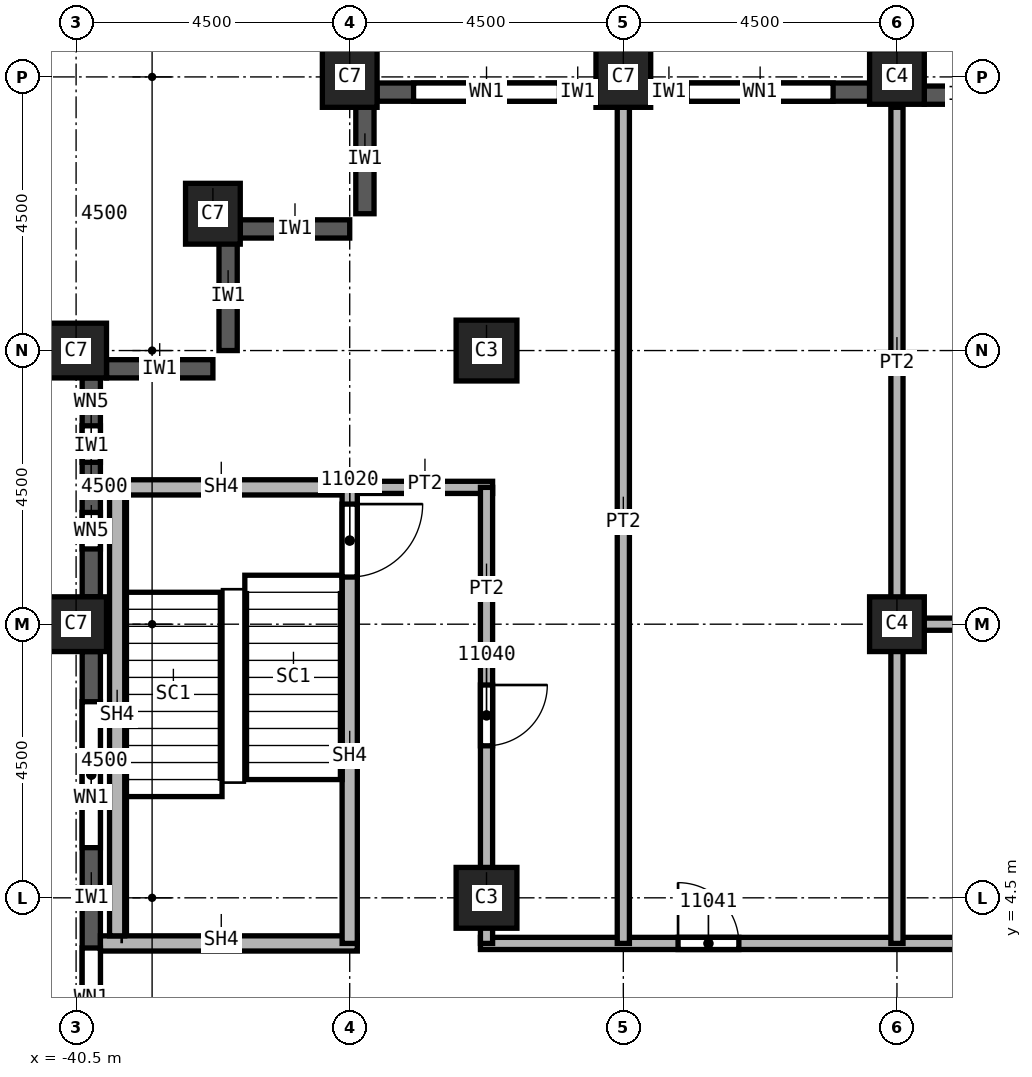
"""IFC4 building model, lengths in metres.
Left out: names, types, materials, properties, quantities, classifications, styles, units other than length and angle.
Written with IfcOpenShell. Run it as: python <this file> out.ifc"""

import sys

from ifc_helpers import new_model, si_unit, direction, frame, frame_2d, origin, origin_2d, place, context, subcontext, project, spatial, rectangle, extrude, element, fill, save


model = new_model("IFC4")
c1 = context("Model", 3, precision=1e-05, world=origin(), true_north=direction((0.0, 1.0)))
c2 = subcontext(c1, "Body", "Model", "MODEL_VIEW")
j1 = project(units=[si_unit("LENGTHUNIT", "METRE"), si_unit("PLANEANGLEUNIT", "RADIAN")], contexts=[c1])
p1 = place(None, origin())
s1 = spatial("IfcSite", under=j1, at=p1, CompositionType="ELEMENT")
p2 = place(p1, origin())
s2 = spatial("IfcBuilding", under=s1, at=p2, CompositionType="ELEMENT")
p3 = place(p2, frame((0.0, 0.0, 184.0)))
s3 = spatial("IfcBuildingStorey", under=s2, at=p3, CompositionType="ELEMENT", Elevation=184.0)
for number, where, z_axis, x_axis in (
    (1, (-40.5, 9.0, 0.0), (0.0, 0.0, 1.0), (0.0, 1.0, 0.0)),
    (2, (-40.5, 13.5, 0.0), (0.0, 0.0, 1.0), (0.0, 1.0, 0.0)),
    (3, (-38.25, 15.75, 0.0), (0.0, 0.0, 1.0), (1.0, 0.0, 0.0)),
    (4, (-31.5, 18.0, 0.0), (0.0, 0.0, 1.0), (1.0, 0.0, 0.0)),
    (5, (-36.0, 18.0, 0.0), (0.0, 0.0, 1.0), (1.0, 0.0, 0.0)),
):
    element("IfcColumn", number, at=place(p3, frame(where, z_axis=z_axis, x_axis=x_axis)), inside=s3, PredefinedType="COLUMN", context=c2, shape_type="SweptSolid", body=[
        extrude(rectangle(XDim=0.9, YDim=1.0, at=origin_2d()), origin(), (0.0, 0.0, 1.0), 3.72),
    ])
for number, where, z_axis, x_axis in (
    (6, (-33.75, 4.5, 0.0), (0.0, 0.0, 1.0), (1.0, 0.0, 0.0)),
    (7, (-33.75, 13.5, 0.0), (0.0, 0.0, 1.0), (1.0, 0.0, 0.0)),
):
    element("IfcColumn", number, at=place(p3, frame(where, z_axis=z_axis, x_axis=x_axis)), inside=s3, PredefinedType="COLUMN", context=c2, shape_type="SweptSolid", body=[
        extrude(rectangle(XDim=1.0, YDim=1.0, at=origin_2d()), origin(), (0.0, 0.0, 1.0), 3.72),
    ])
for number, where, z_axis, x_axis in (
    (8, (-27.0, 9.0, 0.0), (0.0, 0.0, 1.0), (1.0, 0.0, 0.0)),
    (9, (-27.0, 18.0, 0.0), (0.0, 0.0, 1.0), (1.0, 0.0, 0.0)),
):
    element("IfcColumn", number, at=place(p3, frame(where, z_axis=z_axis, x_axis=x_axis)), inside=s3, PredefinedType="COLUMN", context=c2, shape_type="SweptSolid", body=[
        extrude(rectangle(XDim=0.9, YDim=0.9, at=origin_2d()), origin(), (0.0, 0.0, 1.0), 3.72),
    ])
for number, where, z_axis, x_axis in (
    (10, (-35.75, 17.55, 0.0), (0.0, 0.0, 1.0), (0.0, -1.0, 0.0)),
    (11, (-37.8, 15.5, 0.0), (0.0, 0.0, 1.0), (1.0, 0.0, 0.0)),
    (12, (-38.0, 15.3, 0.0), (0.0, 0.0, 1.0), (0.0, -1.0, 0.0)),
):
    element("IfcWall", number, at=place(p3, frame(where, z_axis=z_axis, x_axis=x_axis)), inside=s3, PredefinedType="SOLIDWALL", context=c2, shape_type="SweptSolid", body=[
        extrude(rectangle(XDim=1.8, YDim=0.3, at=frame_2d((0.9, 0.0))), origin(), (0.0, 0.0, 1.0), 3.12),
    ])
p4 = place(p3, frame((-40.0, 13.2, 0.0), z_axis=(0.0, 0.0, 1.0), x_axis=(1.0, 0.0, 0.0)))
e13 = element("IfcWall", 13, at=p4, inside=s3, PredefinedType="SOLIDWALL", context=c2, shape_type="SweptSolid", body=[
    extrude(rectangle(XDim=1.75, YDim=0.3, at=frame_2d((0.875, 0.0))), origin(), (0.0, 0.0, 1.0), 3.12),
])
p5 = place(p3, frame((-25.2, 17.7, 0.0), z_axis=(0.0, 0.0, 1.0), x_axis=(-1.0, 0.0, 0.0)))
e14 = element("IfcWall", 14, at=p5, inside=s3, PredefinedType="SOLIDWALL", context=c2, shape_type="SweptSolid", body=[
    extrude(rectangle(XDim=1.35, YDim=0.3, at=frame_2d((0.675, 0.0))), origin(), (0.0, 0.0, 1.0), 3.12),
])
p6 = place(p3, frame((-27.45, 17.75, 0.0), z_axis=(0.0, 0.0, 1.0), x_axis=(-1.0, 0.0, 0.0)))
e15 = element("IfcWall", 15, at=p6, inside=s3, PredefinedType="SOLIDWALL", context=c2, shape_type="SweptSolid", body=[
    extrude(rectangle(XDim=3.6, YDim=0.3, at=frame_2d((1.8, 0.0))), origin(), (0.0, 0.0, 1.0), 3.12),
])
p7 = place(p6, frame((0.6, 0.0, 0.8)))
e16 = element("IfcOpeningElement", 16, at=p7, cuts=e15, PredefinedType="OPENING", context=c2, shape_type="SweptSolid", body=[
    extrude(rectangle(XDim=2.4, YDim=1.95, at=frame_2d((1.2, 0.975))), frame((0.0, 0.15, 0.0), z_axis=(0.0, -1.0, 0.0), x_axis=(1.0, 0.0, 0.0)), (0.0, 0.0, 1.0), 0.3),
])
p8 = place(p3, frame((-31.95, 17.75, 0.0), z_axis=(0.0, 0.0, 1.0), x_axis=(-1.0, 0.0, 0.0)))
e17 = element("IfcWall", 17, at=p8, inside=s3, PredefinedType="SOLIDWALL", context=c2, shape_type="SweptSolid", body=[
    extrude(rectangle(XDim=3.6, YDim=0.3, at=frame_2d((1.8, 0.0))), origin(), (0.0, 0.0, 1.0), 3.12),
])
p9 = place(p8, frame((0.6, 0.0, 0.8)))
e18 = element("IfcOpeningElement", 18, at=p9, cuts=e17, PredefinedType="OPENING", context=c2, shape_type="SweptSolid", body=[
    extrude(rectangle(XDim=2.4, YDim=1.95, at=frame_2d((1.2, 0.975))), frame((0.0, 0.15, 0.0), z_axis=(0.0, -1.0, 0.0), x_axis=(1.0, 0.0, 0.0)), (0.0, 0.0, 1.0), 0.3),
])
p10 = place(p3, frame((-40.25, 13.05, 0.0), z_axis=(0.0, 0.0, 1.0), x_axis=(0.0, -1.0, 0.0)))
e19 = element("IfcWall", 19, at=p10, inside=s3, PredefinedType="SOLIDWALL", context=c2, shape_type="SweptSolid", body=[
    extrude(rectangle(XDim=3.6, YDim=0.3, at=frame_2d((1.8, 0.0))), origin(), (0.0, 0.0, 1.0), 3.12),
])
p11 = place(p10, frame((0.788, 0.0, 0.8)))
e20 = element("IfcOpeningElement", 20, at=p11, cuts=e19, PredefinedType="OPENING", context=c2, shape_type="SweptSolid", body=[
    extrude(rectangle(XDim=0.6, YDim=1.95, at=frame_2d((0.3, 0.975))), frame((0.0, 0.15, 0.0), z_axis=(0.0, -1.0, 0.0), x_axis=(1.0, 0.0, 0.0)), (0.0, 0.0, 1.0), 0.3),
])
p12 = place(p10, frame((2.212, 0.0, 0.8)))
e21 = element("IfcOpeningElement", 21, at=p12, cuts=e19, PredefinedType="OPENING", context=c2, shape_type="SweptSolid", body=[
    extrude(rectangle(XDim=0.6, YDim=1.95, at=frame_2d((0.3, 0.975))), frame((0.0, 0.15, 0.0), z_axis=(0.0, -1.0, 0.0), x_axis=(1.0, 0.0, 0.0)), (0.0, 0.0, 1.0), 0.3),
])
p13 = place(p3, frame((-40.25, 8.55, 0.0), z_axis=(0.0, 0.0, 1.0), x_axis=(0.0, -1.0, 0.0)))
e22 = element("IfcWall", 22, at=p13, inside=s3, PredefinedType="SOLIDWALL", context=c2, shape_type="SweptSolid", body=[
    extrude(rectangle(XDim=8.1, YDim=0.3, at=frame_2d((4.05, 0.0))), origin(), (0.0, 0.0, 1.0), 3.12),
])
p14 = place(p13, frame((0.825, 0.0, 0.8)))
e23 = element("IfcOpeningElement", 23, at=p14, cuts=e22, PredefinedType="OPENING", context=c2, shape_type="SweptSolid", body=[
    extrude(rectangle(XDim=2.4, YDim=1.95, at=frame_2d((1.2, 0.975))), frame((0.0, 0.15, 0.0), z_axis=(0.0, -1.0, 0.0), x_axis=(1.0, 0.0, 0.0)), (0.0, 0.0, 1.0), 0.3),
])
p15 = place(p13, frame((4.875, 0.0, 0.8)))
e24 = element("IfcOpeningElement", 24, at=p15, cuts=e22, PredefinedType="OPENING", context=c2, shape_type="SweptSolid", body=[
    extrude(rectangle(XDim=2.4, YDim=1.95, at=frame_2d((1.2, 0.975))), frame((0.0, 0.15, 0.0), z_axis=(0.0, -1.0, 0.0), x_axis=(1.0, 0.0, 0.0)), (0.0, 0.0, 1.0), 0.3),
])
p16 = place(p3, frame((-36.0, 11.25, 0.0), z_axis=(0.0, 0.0, 1.0), x_axis=(1.0, 0.0, 0.0)))
e25 = element("IfcWall", 25, at=p16, inside=s3, PredefinedType="PARTITIONING", context=c2, shape_type="SweptSolid", body=[
    extrude(rectangle(XDim=2.35, YDim=0.2, at=frame_2d((1.175, 0.0))), origin(), (0.0, 0.0, 1.0), 3.72),
])
p17 = place(p3, frame((-33.85, 3.75, 0.0), z_axis=(0.0, 0.0, 1.0), x_axis=(1.0, 0.0, 0.0)))
e26 = element("IfcWall", 26, at=p17, inside=s3, PredefinedType="PARTITIONING", context=c2, shape_type="SweptSolid", body=[
    extrude(rectangle(XDim=13.95, YDim=0.2, at=frame_2d((6.975, 0.0))), origin(), (0.0, 0.0, 1.0), 3.72),
])
p18 = place(p17, frame((12.55, 0.0, 0.0)))
e27 = element("IfcOpeningElement", 27, at=p18, cuts=e26, PredefinedType="OPENING", context=c2, shape_type="SweptSolid", body=[
    extrude(rectangle(XDim=1.0, YDim=2.1, at=frame_2d((0.5, 1.05))), frame((0.0, 0.1, 0.0), z_axis=(0.0, -1.0, 0.0), x_axis=(1.0, 0.0, 0.0)), (0.0, 0.0, 1.0), 0.2),
])
p19 = place(p17, frame((3.25, 0.0, 0.0)))
e28 = element("IfcOpeningElement", 28, at=p19, cuts=e26, PredefinedType="OPENING", context=c2, shape_type="SweptSolid", body=[
    extrude(rectangle(XDim=1.0, YDim=2.1, at=frame_2d((0.5, 1.05))), frame((0.0, 0.1, 0.0), z_axis=(0.0, -1.0, 0.0), x_axis=(1.0, 0.0, 0.0)), (0.0, 0.0, 1.0), 0.2),
])
p20 = place(p3, frame((-33.75, 11.25, 0.0), z_axis=(0.0, 0.0, 1.0), x_axis=(0.0, -1.0, 0.0)))
e29 = element("IfcWall", 29, at=p20, inside=s3, PredefinedType="PARTITIONING", context=c2, shape_type="SweptSolid", body=[
    extrude(rectangle(XDim=7.5, YDim=0.2, at=frame_2d((3.75, 0.0))), origin(), (0.0, 0.0, 1.0), 3.72),
])
p21 = place(p20, frame((3.25, 0.0, 0.0)))
e30 = element("IfcOpeningElement", 30, at=p21, cuts=e29, PredefinedType="OPENING", context=c2, shape_type="SweptSolid", body=[
    extrude(rectangle(XDim=1.0, YDim=2.1, at=frame_2d((0.5, 1.05))), frame((0.0, 0.1, 0.0), z_axis=(0.0, -1.0, 0.0), x_axis=(1.0, 0.0, 0.0)), (0.0, 0.0, 1.0), 0.2),
])
p22 = place(p3, frame((-31.5, 17.5, 0.0), z_axis=(0.0, 0.0, 1.0), x_axis=(0.0, -1.0, 0.0)))
e31 = element("IfcWall", 31, at=p22, inside=s3, PredefinedType="PARTITIONING", context=c2, shape_type="SweptSolid", body=[
    extrude(rectangle(XDim=13.75, YDim=0.2, at=frame_2d((6.875, 0.0))), origin(), (0.0, 0.0, 1.0), 3.72),
])
p23 = place(p3, frame((-27.1, 9.0, 0.0), z_axis=(0.0, 0.0, 1.0), x_axis=(1.0, 0.0, 0.0)))
e32 = element("IfcWall", 32, at=p23, inside=s3, PredefinedType="PARTITIONING", context=c2, shape_type="SweptSolid", body=[
    extrude(rectangle(XDim=7.2, YDim=0.2, at=frame_2d((3.6, 0.0))), origin(), (0.0, 0.0, 1.0), 3.72),
])
p24 = place(p3, frame((-27.0, 3.75, 0.0), z_axis=(0.0, 0.0, 1.0), x_axis=(0.0, 1.0, 0.0)))
e33 = element("IfcWall", 33, at=p24, inside=s3, PredefinedType="PARTITIONING", context=c2, shape_type="SweptSolid", body=[
    extrude(rectangle(XDim=13.75, YDim=0.2, at=frame_2d((6.875, 0.0))), origin(), (0.0, 0.0, 1.0), 3.72),
])
p25 = place(p3, frame((-40.1, 3.75, 0.0), z_axis=(0.0, 0.0, 1.0), x_axis=(1.0, 0.0, 0.0)))
e34 = element("IfcWall", 34, at=p25, inside=s3, PredefinedType="SOLIDWALL", context=c2, shape_type="SweptSolid", body=[
    extrude(rectangle(XDim=4.225, YDim=0.25, at=frame_2d((2.113, 0.0))), origin(), (0.0, 0.0, 1.0), 3.72),
])
p26 = place(p3, frame((-40.1, 11.25, 0.0), z_axis=(0.0, 0.0, 1.0), x_axis=(1.0, 0.0, 0.0)))
e35 = element("IfcWall", 35, at=p26, inside=s3, PredefinedType="SOLIDWALL", context=c2, shape_type="SweptSolid", body=[
    extrude(rectangle(XDim=4.1, YDim=0.25, at=frame_2d((2.05, 0.0))), origin(), (0.0, 0.0, 1.0), 3.72),
])
p27 = place(p3, frame((-36.0, 11.375, 0.0), z_axis=(0.0, 0.0, 1.0), x_axis=(0.0, -1.0, 0.0)))
e36 = element("IfcWall", 36, at=p27, inside=s3, PredefinedType="SOLIDWALL", context=c2, shape_type="SweptSolid", body=[
    extrude(rectangle(XDim=7.625, YDim=0.25, at=frame_2d((3.812, 0.0))), origin(), (0.0, 0.0, 1.0), 3.72),
])
p28 = place(p27, frame((0.4, 0.0, 0.0)))
e37 = element("IfcOpeningElement", 37, at=p28, cuts=e36, PredefinedType="OPENING", context=c2, shape_type="SweptSolid", body=[
    extrude(rectangle(XDim=1.2, YDim=2.1, at=frame_2d((0.6, 1.05))), frame((0.0, 0.125, 0.0), z_axis=(0.0, -1.0, 0.0), x_axis=(1.0, 0.0, 0.0)), (0.0, 0.0, 1.0), 0.25),
])
p29 = place(p3, frame((-39.825, 3.875, 0.0), z_axis=(0.0, 0.0, 1.0), x_axis=(0.0, 1.0, 0.0)))
e38 = element("IfcWall", 38, at=p29, inside=s3, PredefinedType="SOLIDWALL", context=c2, shape_type="SweptSolid", body=[
    extrude(rectangle(XDim=7.25, YDim=0.25, at=frame_2d((3.625, 0.0))), origin(), (0.0, 0.0, 1.0), 3.72),
])
p30 = place(p7, origin())
e39 = element("IfcWindow", 39, at=p30, inside=s3, PartitioningType="SINGLE_PANEL", PredefinedType="WINDOW", context=c2, shape_type="SweptSolid", body=[
    extrude(rectangle(XDim=2.4, YDim=1.95, at=frame_2d((1.2, 0.975))), frame((0.0, 0.03, 0.0), z_axis=(0.0, -1.0, 0.0), x_axis=(1.0, 0.0, 0.0)), (0.0, 0.0, 1.0), 0.06),
])
fill(e16, e39)
p31 = place(p9, origin())
e40 = element("IfcWindow", 40, at=p31, inside=s3, PartitioningType="SINGLE_PANEL", PredefinedType="WINDOW", context=c2, shape_type="SweptSolid", body=[
    extrude(rectangle(XDim=2.4, YDim=1.95, at=frame_2d((1.2, 0.975))), frame((0.0, 0.03, 0.0), z_axis=(0.0, -1.0, 0.0), x_axis=(1.0, 0.0, 0.0)), (0.0, 0.0, 1.0), 0.06),
])
fill(e18, e40)
p32 = place(p14, origin())
e41 = element("IfcWindow", 41, at=p32, inside=s3, PartitioningType="SINGLE_PANEL", PredefinedType="WINDOW", context=c2, shape_type="SweptSolid", body=[
    extrude(rectangle(XDim=2.4, YDim=1.95, at=frame_2d((1.2, 0.975))), frame((0.0, 0.03, 0.0), z_axis=(0.0, -1.0, 0.0), x_axis=(1.0, 0.0, 0.0)), (0.0, 0.0, 1.0), 0.06),
])
fill(e23, e41)
p33 = place(p15, origin())
e42 = element("IfcWindow", 42, at=p33, inside=s3, PartitioningType="SINGLE_PANEL", PredefinedType="WINDOW", context=c2, shape_type="SweptSolid", body=[
    extrude(rectangle(XDim=2.4, YDim=1.95, at=frame_2d((1.2, 0.975))), frame((0.0, 0.03, 0.0), z_axis=(0.0, -1.0, 0.0), x_axis=(1.0, 0.0, 0.0)), (0.0, 0.0, 1.0), 0.06),
])
fill(e24, e42)
p34 = place(p28, origin())
e43 = element("IfcDoor", 43, at=p34, inside=s3, OperationType="SINGLE_SWING_LEFT", PredefinedType="DOOR", context=c2, shape_type="SweptSolid", body=[
    extrude(rectangle(XDim=1.2, YDim=2.1, at=frame_2d((0.6, 1.05))), frame((0.0, 0.025, 0.0), z_axis=(0.0, -1.0, 0.0), x_axis=(1.0, 0.0, 0.0)), (0.0, 0.0, 1.0), 0.05),
])
fill(e37, e43)
p35 = place(p21, origin())
e44 = element("IfcDoor", 44, at=p35, inside=s3, OperationType="SINGLE_SWING_LEFT", PredefinedType="DOOR", context=c2, shape_type="SweptSolid", body=[
    extrude(rectangle(XDim=1.0, YDim=2.1, at=frame_2d((0.5, 1.05))), frame((0.0, 0.025, 0.0), z_axis=(0.0, -1.0, 0.0), x_axis=(1.0, 0.0, 0.0)), (0.0, 0.0, 1.0), 0.05),
])
fill(e30, e44)
p36 = place(p19, origin())
e45 = element("IfcDoor", 45, at=p36, inside=s3, OperationType="SINGLE_SWING_RIGHT", PredefinedType="DOOR", context=c2, shape_type="SweptSolid", body=[
    extrude(rectangle(XDim=1.0, YDim=2.1, at=frame_2d((0.5, 1.05))), frame((0.0, 0.025, 0.0), z_axis=(0.0, -1.0, 0.0), x_axis=(1.0, 0.0, 0.0)), (0.0, 0.0, 1.0), 0.05),
])
fill(e28, e45)
p37 = place(p11, origin())
e46 = element("IfcWindow", 46, at=p37, inside=s3, PartitioningType="SINGLE_PANEL", PredefinedType="WINDOW", context=c2, shape_type="SweptSolid", body=[
    extrude(rectangle(XDim=0.6, YDim=1.95, at=frame_2d((0.3, 0.975))), frame((0.0, 0.03, 0.0), z_axis=(0.0, -1.0, 0.0), x_axis=(1.0, 0.0, 0.0)), (0.0, 0.0, 1.0), 0.06),
])
fill(e20, e46)
p38 = place(p12, origin())
e47 = element("IfcWindow", 47, at=p38, inside=s3, PartitioningType="SINGLE_PANEL", PredefinedType="WINDOW", context=c2, shape_type="SweptSolid", body=[
    extrude(rectangle(XDim=0.6, YDim=1.95, at=frame_2d((0.3, 0.975))), frame((0.0, 0.03, 0.0), z_axis=(0.0, -1.0, 0.0), x_axis=(1.0, 0.0, 0.0)), (0.0, 0.0, 1.0), 0.06),
])
fill(e21, e47)
save(model, sys.argv[1])
